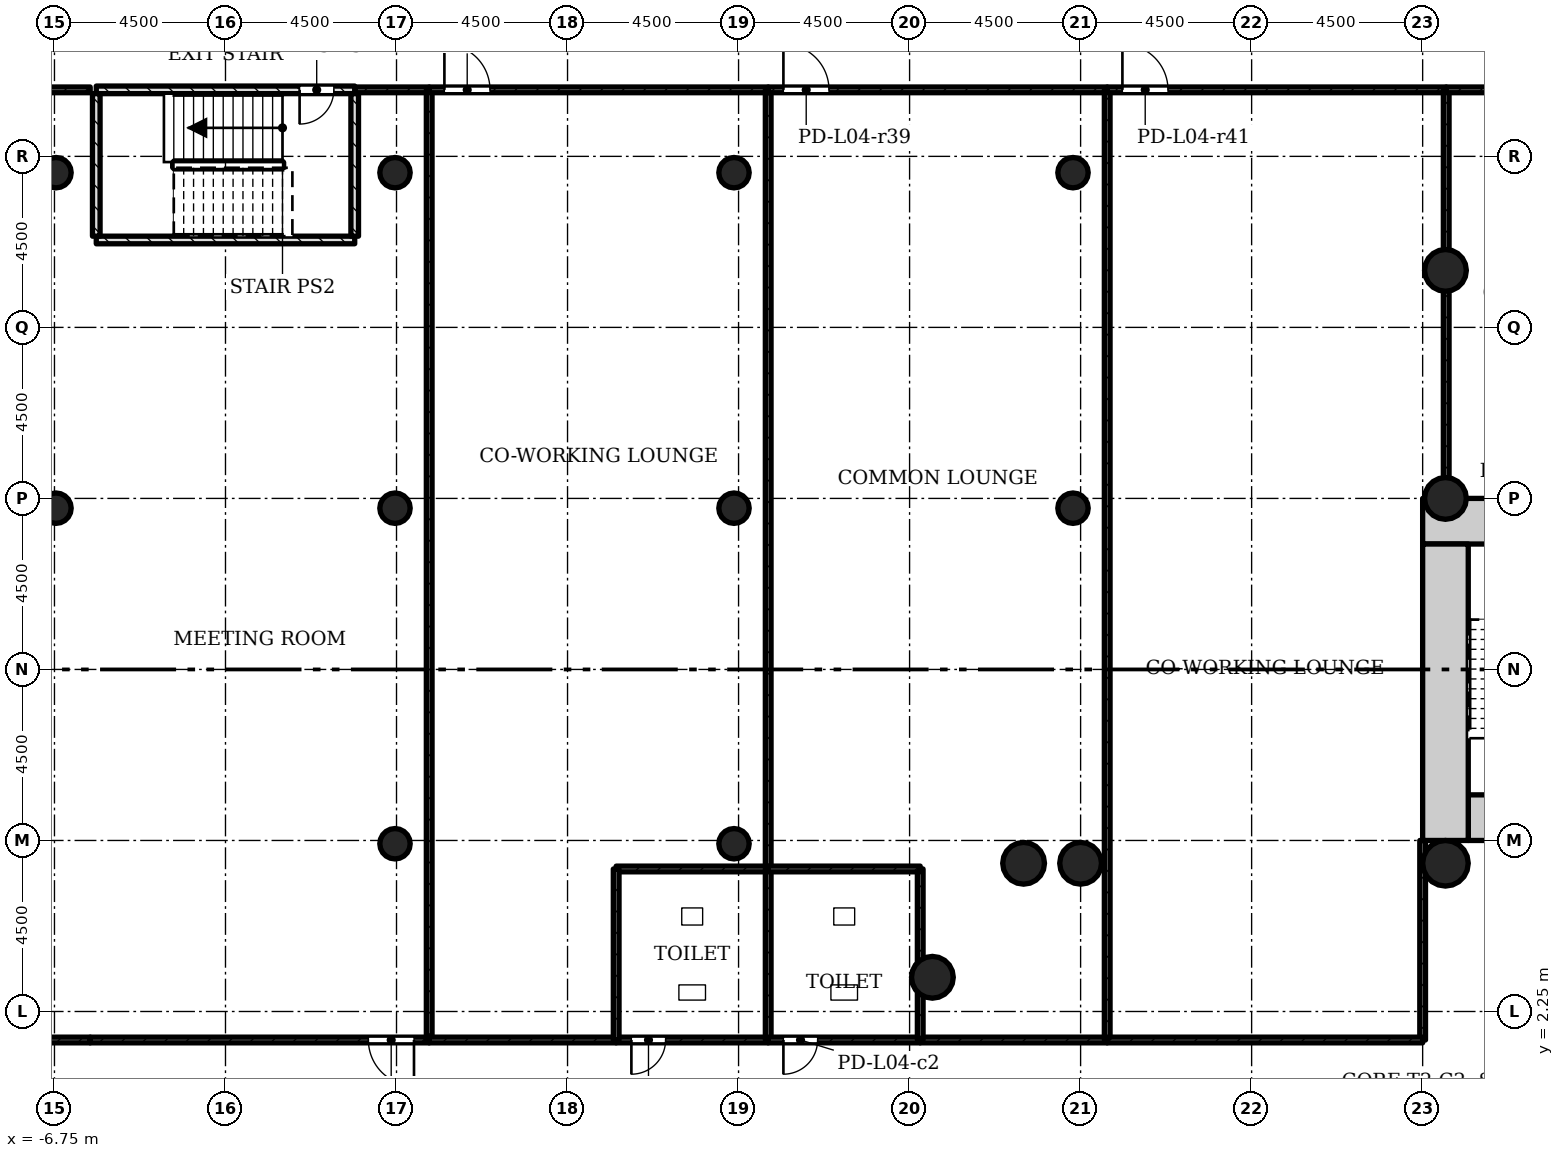
"""IFC4 building model, lengths in metres.
Left out: names, types, materials, properties, quantities, classifications, styles, units other than length and angle.
Written with IfcOpenShell. Run it as: python <this file> out.ifc"""

import sys

from ifc_helpers import new_model, si_unit, direction, frame, frame_2d, origin, origin_2d, place, context, subcontext, project, spatial, rectangle, hollow_circle, extrude, element, fill, save


model = new_model("IFC4")
c1 = context("Model", 3, precision=1e-05, world=origin(), true_north=direction((0.0, 1.0)))
c2 = subcontext(c1, "Body", "Model", "MODEL_VIEW")
j1 = project(units=[si_unit("LENGTHUNIT", "METRE"), si_unit("PLANEANGLEUNIT", "RADIAN")], contexts=[c1])
p1 = place(None, origin())
s1 = spatial("IfcSite", under=j1, at=p1, CompositionType="ELEMENT")
p2 = place(p1, origin())
s2 = spatial("IfcBuilding", under=s1, at=p2, CompositionType="ELEMENT")
p3 = place(p2, frame((0.0, 0.0, 20.0)))
s3 = spatial("IfcBuildingStorey", under=s2, at=p3, CompositionType="ELEMENT", Elevation=20.0)
p4 = place(p3, frame((30.45, 7.35, 0.0), z_axis=(0.0, 0.0, 1.0), x_axis=(1.0, 0.0, 0.0)))
e1 = element("IfcWall", 1, at=p4, inside=s3, PredefinedType="SHEAR", context=c2, shape_type="SweptSolid", body=[
    extrude(rectangle(XDim=12.3, YDim=1.2, at=frame_2d((6.15, 0.0))), origin(), (0.0, 0.0, 1.0), 4.5),
])
p5 = place(p4, frame((4.65, 0.0, 0.0)))
e2 = element("IfcOpeningElement", 2, at=p5, cuts=e1, PredefinedType="OPENING", context=c2, shape_type="SweptSolid", body=[
    extrude(rectangle(XDim=1.8, YDim=2.1, at=frame_2d((0.9, 1.05))), frame((0.0, 0.61, 0.0), z_axis=(0.0, -1.0, 0.0), x_axis=(1.0, 0.0, 0.0)), (0.0, 0.0, 1.0), 1.22),
])
p6 = place(p3, frame((41.55, 15.15, 0.0), z_axis=(0.0, 0.0, 1.0), x_axis=(-1.0, 0.0, 0.0)))
e3 = element("IfcWall", 3, at=p6, inside=s3, PredefinedType="SHEAR", context=c2, shape_type="SweptSolid", body=[
    extrude(rectangle(XDim=12.3, YDim=1.2, at=frame_2d((6.15, 0.0))), origin(), (0.0, 0.0, 1.0), 4.5),
])
p7 = place(p6, frame((4.65, 0.0, 0.0)))
e4 = element("IfcOpeningElement", 4, at=p7, cuts=e3, PredefinedType="OPENING", context=c2, shape_type="SweptSolid", body=[
    extrude(rectangle(XDim=1.8, YDim=2.1, at=frame_2d((0.9, 1.05))), frame((0.0, 0.61, 0.0), z_axis=(0.0, -1.0, 0.0), x_axis=(1.0, 0.0, 0.0)), (0.0, 0.0, 1.0), 1.22),
])
p8 = place(p3, frame((29.85, 14.55, 0.0), z_axis=(0.0, 0.0, 1.0), x_axis=(0.0, -1.0, 0.0)))
e5 = element("IfcWall", 5, at=p8, inside=s3, PredefinedType="SHEAR", context=c2, shape_type="SweptSolid", body=[
    extrude(rectangle(XDim=7.8, YDim=1.2, at=frame_2d((3.9, 0.0))), origin(), (0.0, 0.0, 1.0), 4.5),
])
for number, where, z_axis, x_axis in (
    (6, (29.85, 15.75, 0.0), (0.0, 0.0, 1.0), (1.0, 0.0, 0.0)),
    (7, (29.85, 21.75, 0.0), (0.0, 0.0, 1.0), (1.0, 0.0, 0.0)),
    (8, (20.25, 6.15, 0.0), (0.0, 0.0, 1.0), (1.0, 0.0, 0.0)),
    (9, (18.75, 6.15, 0.0), (0.0, 0.0, 1.0), (1.0, 0.0, 0.0)),
    (10, (16.35, 3.15, 0.0), (0.0, 0.0, 1.0), (1.0, 0.0, 0.0)),
):
    element("IfcColumn", number, at=place(p3, frame(where, z_axis=z_axis, x_axis=x_axis)), inside=s3, PredefinedType="COLUMN", context=c2, shape_type="SweptSolid", body=[
        extrude(hollow_circle(Radius=0.55, WallThickness=0.04, at=origin_2d()), origin(), (0.0, 0.0, 1.0), 4.5),
    ])
p9 = place(p3, frame((29.85, 6.15, 0.0), z_axis=(0.0, 0.0, 1.0), x_axis=(1.0, 0.0, 0.0)))
e11 = element("IfcColumn", 11, at=p9, inside=s3, PredefinedType="COLUMN", context=c2, shape_type="SweptSolid", body=[
    extrude(hollow_circle(Radius=0.6, WallThickness=0.045, at=origin_2d()), origin(), (0.0, 0.0, 1.0), 4.5),
])
for number, where, z_axis, x_axis in (
    (12, (2.21, 6.664, 0.0), (0.0, 0.0, 1.0), (1.0, 0.0, 0.0)),
    (13, (11.13, 6.664, 0.0), (0.0, 0.0, 1.0), (1.0, 0.0, 0.0)),
    (14, (-6.71, 15.493, 0.0), (0.0, 0.0, 1.0), (1.0, 0.0, 0.0)),
    (15, (2.21, 15.493, 0.0), (0.0, 0.0, 1.0), (1.0, 0.0, 0.0)),
    (16, (11.13, 15.493, 0.0), (0.0, 0.0, 1.0), (1.0, 0.0, 0.0)),
    (17, (20.05, 15.493, 0.0), (0.0, 0.0, 1.0), (1.0, 0.0, 0.0)),
    (18, (-6.71, 24.321, 0.0), (0.0, 0.0, 1.0), (1.0, 0.0, 0.0)),
    (19, (2.21, 24.321, 0.0), (0.0, 0.0, 1.0), (1.0, 0.0, 0.0)),
    (20, (11.13, 24.321, 0.0), (0.0, 0.0, 1.0), (1.0, 0.0, 0.0)),
    (21, (20.05, 24.321, 0.0), (0.0, 0.0, 1.0), (1.0, 0.0, 0.0)),
):
    element("IfcColumn", number, at=place(p3, frame(where, z_axis=z_axis, x_axis=x_axis)), inside=s3, PredefinedType="COLUMN", context=c2, shape_type="SweptSolid", body=[
        extrude(hollow_circle(Radius=0.4, WallThickness=0.028, at=origin_2d()), origin(), (0.0, 0.0, 1.0), 4.08),
    ])
p10 = place(p3, frame((-14.73, 26.5, 0.0), z_axis=(0.0, 0.0, 1.0), x_axis=(1.0, 0.0, 0.0)))
e22 = element("IfcWall", 22, at=p10, inside=s3, PredefinedType="PARTITIONING", context=c2, shape_type="SweptSolid", body=[
    extrude(rectangle(XDim=8.92, YDim=0.15, at=frame_2d((4.46, 0.0))), origin(), (0.0, 0.0, 1.0), 4.075),
])
p11 = place(p10, frame((0.4, 0.0, 0.0)))
e23 = element("IfcOpeningElement", 23, at=p11, cuts=e22, PredefinedType="OPENING", context=c2, shape_type="SweptSolid", body=[
    extrude(rectangle(XDim=1.2, YDim=2.1, at=frame_2d((0.6, 1.05))), frame((0.0, 0.085, 0.0), z_axis=(0.0, -1.0, 0.0), x_axis=(1.0, 0.0, 0.0)), (0.0, 0.0, 1.0), 0.17),
])
p12 = place(p3, frame((-5.81, 1.5, 0.0), z_axis=(0.0, 0.0, 1.0), x_axis=(-1.0, 0.0, 0.0)))
e24 = element("IfcWall", 24, at=p12, inside=s3, PredefinedType="PARTITIONING", context=c2, shape_type="SweptSolid", body=[
    extrude(rectangle(XDim=8.92, YDim=0.15, at=frame_2d((4.46, 0.0))), origin(), (0.0, 0.0, 1.0), 4.075),
])
p13 = place(p3, frame((-5.65, 26.5, 0.0), z_axis=(0.0, 0.0, 1.0), x_axis=(1.0, 0.0, 0.0)))
e25 = element("IfcWall", 25, at=p13, inside=s3, PredefinedType="SHEAR", context=c2, shape_type="SweptSolid", body=[
    extrude(rectangle(XDim=6.8, YDim=0.2, at=frame_2d((3.4, 0.0))), origin(), (0.0, 0.0, 1.0), 4.075),
])
p14 = place(p13, frame((5.35, 0.0, 0.0)))
e26 = element("IfcOpeningElement", 26, at=p14, cuts=e25, PredefinedType="OPENING", context=c2, shape_type="SweptSolid", body=[
    extrude(rectangle(XDim=0.9, YDim=2.1, at=frame_2d((0.45, 1.05))), frame((0.0, 0.11, 0.0), z_axis=(0.0, -1.0, 0.0), x_axis=(1.0, 0.0, 0.0)), (0.0, 0.0, 1.0), 0.22),
])
p15 = place(p3, frame((-5.65, 22.55, 0.0), z_axis=(0.0, 0.0, 1.0), x_axis=(1.0, 0.0, 0.0)))
e27 = element("IfcWall", 27, at=p15, inside=s3, PredefinedType="SHEAR", context=c2, shape_type="SweptSolid", body=[
    extrude(rectangle(XDim=6.8, YDim=0.2, at=frame_2d((3.4, 0.0))), origin(), (0.0, 0.0, 1.0), 4.075),
])
for number, where, z_axis, x_axis in (
    (28, (-5.65, 22.65, 0.0), (0.0, 0.0, 1.0), (0.0, 1.0, 0.0)),
    (29, (1.15, 22.65, 0.0), (0.0, 0.0, 1.0), (0.0, 1.0, 0.0)),
):
    element("IfcWall", number, at=place(p3, frame(where, z_axis=z_axis, x_axis=x_axis)), inside=s3, PredefinedType="SHEAR", context=c2, shape_type="SweptSolid", body=[
        extrude(rectangle(XDim=3.75, YDim=0.2, at=frame_2d((1.875, 0.0))), origin(), (0.0, 0.0, 1.0), 4.075),
    ])
p16 = place(p3, frame((1.15, 26.5, 0.0), z_axis=(0.0, 0.0, 1.0), x_axis=(1.0, 0.0, 0.0)))
e30 = element("IfcWall", 30, at=p16, inside=s3, PredefinedType="PARTITIONING", context=c2, shape_type="SweptSolid", body=[
    extrude(rectangle(XDim=1.96, YDim=0.15, at=frame_2d((0.98, 0.0))), origin(), (0.0, 0.0, 1.0), 4.075),
])
p17 = place(p3, frame((3.11, 1.5, 0.0), z_axis=(0.0, 0.0, 1.0), x_axis=(-1.0, 0.0, 0.0)))
e31 = element("IfcWall", 31, at=p17, inside=s3, PredefinedType="PARTITIONING", context=c2, shape_type="SweptSolid", body=[
    extrude(rectangle(XDim=8.92, YDim=0.15, at=frame_2d((4.46, 0.0))), origin(), (0.0, 0.0, 1.0), 4.075),
])
p18 = place(p17, frame((0.4, 0.0, 0.0)))
e32 = element("IfcOpeningElement", 32, at=p18, cuts=e31, PredefinedType="OPENING", context=c2, shape_type="SweptSolid", body=[
    extrude(rectangle(XDim=1.2, YDim=2.1, at=frame_2d((0.6, 1.05))), frame((0.0, 0.085, 0.0), z_axis=(0.0, -1.0, 0.0), x_axis=(1.0, 0.0, 0.0)), (0.0, 0.0, 1.0), 0.17),
])
p19 = place(p3, frame((3.11, 26.5, 0.0), z_axis=(0.0, 0.0, 1.0), x_axis=(0.0, -1.0, 0.0)))
e33 = element("IfcWall", 33, at=p19, inside=s3, PredefinedType="PARTITIONING", context=c2, shape_type="SweptSolid", body=[
    extrude(rectangle(XDim=25.0, YDim=0.15, at=frame_2d((12.5, 0.0))), origin(), (0.0, 0.0, 1.0), 4.075),
])
p20 = place(p3, frame((8.03, 1.5, 0.0), z_axis=(0.0, 0.0, 1.0), x_axis=(-1.0, 0.0, 0.0)))
e34 = element("IfcWall", 34, at=p20, inside=s3, PredefinedType="PARTITIONING", context=c2, shape_type="SweptSolid", body=[
    extrude(rectangle(XDim=4.92, YDim=0.15, at=frame_2d((2.46, 0.0))), origin(), (0.0, 0.0, 1.0), 4.075),
])
p21 = place(p3, frame((3.11, 26.5, 0.0), z_axis=(0.0, 0.0, 1.0), x_axis=(1.0, 0.0, 0.0)))
e35 = element("IfcWall", 35, at=p21, inside=s3, PredefinedType="PARTITIONING", context=c2, shape_type="SweptSolid", body=[
    extrude(rectangle(XDim=8.92, YDim=0.15, at=frame_2d((4.46, 0.0))), origin(), (0.0, 0.0, 1.0), 4.075),
])
p22 = place(p21, frame((0.4, 0.0, 0.0)))
e36 = element("IfcOpeningElement", 36, at=p22, cuts=e35, PredefinedType="OPENING", context=c2, shape_type="SweptSolid", body=[
    extrude(rectangle(XDim=1.2, YDim=2.1, at=frame_2d((0.6, 1.05))), frame((0.0, 0.085, 0.0), z_axis=(0.0, -1.0, 0.0), x_axis=(1.0, 0.0, 0.0)), (0.0, 0.0, 1.0), 0.17),
])
p23 = place(p3, frame((12.03, 26.5, 0.0), z_axis=(0.0, 0.0, 1.0), x_axis=(0.0, -1.0, 0.0)))
e37 = element("IfcWall", 37, at=p23, inside=s3, PredefinedType="PARTITIONING", context=c2, shape_type="SweptSolid", body=[
    extrude(rectangle(XDim=20.5, YDim=0.15, at=frame_2d((10.25, 0.0))), origin(), (0.0, 0.0, 1.0), 4.075),
])
p24 = place(p3, frame((12.03, 26.5, 0.0), z_axis=(0.0, 0.0, 1.0), x_axis=(1.0, 0.0, 0.0)))
e38 = element("IfcWall", 38, at=p24, inside=s3, PredefinedType="PARTITIONING", context=c2, shape_type="SweptSolid", body=[
    extrude(rectangle(XDim=8.92, YDim=0.15, at=frame_2d((4.46, 0.0))), origin(), (0.0, 0.0, 1.0), 4.075),
])
p25 = place(p24, frame((0.4, 0.0, 0.0)))
e39 = element("IfcOpeningElement", 39, at=p25, cuts=e38, PredefinedType="OPENING", context=c2, shape_type="SweptSolid", body=[
    extrude(rectangle(XDim=1.2, YDim=2.1, at=frame_2d((0.6, 1.05))), frame((0.0, 0.085, 0.0), z_axis=(0.0, -1.0, 0.0), x_axis=(1.0, 0.0, 0.0)), (0.0, 0.0, 1.0), 0.17),
])
p26 = place(p3, frame((20.95, 1.5, 0.0), z_axis=(0.0, 0.0, 1.0), x_axis=(-1.0, 0.0, 0.0)))
e40 = element("IfcWall", 40, at=p26, inside=s3, PredefinedType="PARTITIONING", context=c2, shape_type="SweptSolid", body=[
    extrude(rectangle(XDim=4.92, YDim=0.15, at=frame_2d((2.46, 0.0))), origin(), (0.0, 0.0, 1.0), 4.075),
])
p27 = place(p3, frame((20.95, 26.5, 0.0), z_axis=(0.0, 0.0, 1.0), x_axis=(0.0, -1.0, 0.0)))
e41 = element("IfcWall", 41, at=p27, inside=s3, PredefinedType="PARTITIONING", context=c2, shape_type="SweptSolid", body=[
    extrude(rectangle(XDim=25.0, YDim=0.15, at=frame_2d((12.5, 0.0))), origin(), (0.0, 0.0, 1.0), 4.075),
])
p28 = place(p3, frame((20.95, 26.5, 0.0), z_axis=(0.0, 0.0, 1.0), x_axis=(1.0, 0.0, 0.0)))
e42 = element("IfcWall", 42, at=p28, inside=s3, PredefinedType="PARTITIONING", context=c2, shape_type="SweptSolid", body=[
    extrude(rectangle(XDim=8.92, YDim=0.15, at=frame_2d((4.46, 0.0))), origin(), (0.0, 0.0, 1.0), 4.075),
])
p29 = place(p28, frame((0.4, 0.0, 0.0)))
e43 = element("IfcOpeningElement", 43, at=p29, cuts=e42, PredefinedType="OPENING", context=c2, shape_type="SweptSolid", body=[
    extrude(rectangle(XDim=1.2, YDim=2.1, at=frame_2d((0.6, 1.05))), frame((0.0, 0.085, 0.0), z_axis=(0.0, -1.0, 0.0), x_axis=(1.0, 0.0, 0.0)), (0.0, 0.0, 1.0), 0.17),
])
p30 = place(p3, frame((29.25, 6.75, 0.0), z_axis=(0.0, 0.0, 1.0), x_axis=(0.0, -1.0, 0.0)))
e44 = element("IfcWall", 44, at=p30, inside=s3, PredefinedType="PARTITIONING", context=c2, shape_type="SweptSolid", body=[
    extrude(rectangle(XDim=5.25, YDim=0.15, at=frame_2d((2.625, 0.0))), origin(), (0.0, 0.0, 1.0), 4.075),
])
p31 = place(p3, frame((29.25, 1.5, 0.0), z_axis=(0.0, 0.0, 1.0), x_axis=(-1.0, 0.0, 0.0)))
e45 = element("IfcWall", 45, at=p31, inside=s3, PredefinedType="PARTITIONING", context=c2, shape_type="SweptSolid", body=[
    extrude(rectangle(XDim=8.3, YDim=0.15, at=frame_2d((4.15, 0.0))), origin(), (0.0, 0.0, 1.0), 4.075),
])
p32 = place(p3, frame((29.87, 26.5, 0.0), z_axis=(0.0, 0.0, 1.0), x_axis=(0.0, -1.0, 0.0)))
e46 = element("IfcWall", 46, at=p32, inside=s3, PredefinedType="PARTITIONING", context=c2, shape_type="SweptSolid", body=[
    extrude(rectangle(XDim=4.75, YDim=0.15, at=frame_2d((2.375, 0.0))), origin(), (0.0, 0.0, 1.0), 4.075),
])
p33 = place(p3, frame((29.87, 21.75, 0.0), z_axis=(0.0, 0.0, 1.0), x_axis=(0.0, -1.0, 0.0)))
e47 = element("IfcWall", 47, at=p33, inside=s3, PredefinedType="PARTITIONING", context=c2, shape_type="SweptSolid", body=[
    extrude(rectangle(XDim=6.0, YDim=0.15, at=frame_2d((3.0, 0.0))), origin(), (0.0, 0.0, 1.0), 3.65),
])
p34 = place(p3, frame((29.87, 26.5, 0.0), z_axis=(0.0, 0.0, 1.0), x_axis=(1.0, 0.0, 0.0)))
e48 = element("IfcWall", 48, at=p34, inside=s3, PredefinedType="PARTITIONING", context=c2, shape_type="SweptSolid", body=[
    extrude(rectangle(XDim=4.63, YDim=0.15, at=frame_2d((2.315, 0.0))), origin(), (0.0, 0.0, 1.0), 4.075),
])
p35 = place(p3, frame((8.03, 1.5, 0.0), z_axis=(0.0, 0.0, 1.0), x_axis=(1.0, 0.0, 0.0)))
e49 = element("IfcWall", 49, at=p35, inside=s3, PredefinedType="PARTITIONING", context=c2, shape_type="SweptSolid", body=[
    extrude(rectangle(XDim=4.0, YDim=0.15, at=frame_2d((2.0, 0.0))), origin(), (0.0, 0.0, 1.0), 4.075),
])
p36 = place(p35, frame((0.4, 0.0, 0.0)))
e50 = element("IfcOpeningElement", 50, at=p36, cuts=e49, PredefinedType="OPENING", context=c2, shape_type="SweptSolid", body=[
    extrude(rectangle(XDim=0.9, YDim=2.1, at=frame_2d((0.45, 1.05))), frame((0.0, 0.085, 0.0), z_axis=(0.0, -1.0, 0.0), x_axis=(1.0, 0.0, 0.0)), (0.0, 0.0, 1.0), 0.17),
])
p37 = place(p3, frame((12.03, 6.0, 0.0), z_axis=(0.0, 0.0, 1.0), x_axis=(-1.0, 0.0, 0.0)))
e51 = element("IfcWall", 51, at=p37, inside=s3, PredefinedType="PARTITIONING", context=c2, shape_type="SweptSolid", body=[
    extrude(rectangle(XDim=4.0, YDim=0.15, at=frame_2d((2.0, 0.0))), origin(), (0.0, 0.0, 1.0), 4.075),
])
for number, where, z_axis, x_axis in (
    (52, (8.03, 6.0, 0.0), (0.0, 0.0, 1.0), (0.0, -1.0, 0.0)),
    (53, (12.03, 1.5, 0.0), (0.0, 0.0, 1.0), (0.0, 1.0, 0.0)),
):
    element("IfcWall", number, at=place(p3, frame(where, z_axis=z_axis, x_axis=x_axis)), inside=s3, PredefinedType="PARTITIONING", context=c2, shape_type="SweptSolid", body=[
        extrude(rectangle(XDim=4.5, YDim=0.15, at=frame_2d((2.25, 0.0))), origin(), (0.0, 0.0, 1.0), 4.075),
    ])
p38 = place(p3, frame((12.03, 1.5, 0.0), z_axis=(0.0, 0.0, 1.0), x_axis=(1.0, 0.0, 0.0)))
e54 = element("IfcWall", 54, at=p38, inside=s3, PredefinedType="PARTITIONING", context=c2, shape_type="SweptSolid", body=[
    extrude(rectangle(XDim=4.0, YDim=0.15, at=frame_2d((2.0, 0.0))), origin(), (0.0, 0.0, 1.0), 4.075),
])
p39 = place(p38, frame((0.4, 0.0, 0.0)))
e55 = element("IfcOpeningElement", 55, at=p39, cuts=e54, PredefinedType="OPENING", context=c2, shape_type="SweptSolid", body=[
    extrude(rectangle(XDim=0.9, YDim=2.1, at=frame_2d((0.45, 1.05))), frame((0.0, 0.085, 0.0), z_axis=(0.0, -1.0, 0.0), x_axis=(1.0, 0.0, 0.0)), (0.0, 0.0, 1.0), 0.17),
])
p40 = place(p3, frame((16.03, 1.5, 0.0), z_axis=(0.0, 0.0, 1.0), x_axis=(0.0, 1.0, 0.0)))
e56 = element("IfcWall", 56, at=p40, inside=s3, PredefinedType="PARTITIONING", context=c2, shape_type="SweptSolid", body=[
    extrude(rectangle(XDim=4.5, YDim=0.15, at=frame_2d((2.25, 0.0))), origin(), (0.0, 0.0, 1.0), 4.075),
])
p41 = place(p3, frame((16.03, 6.0, 0.0), z_axis=(0.0, 0.0, 1.0), x_axis=(-1.0, 0.0, 0.0)))
e57 = element("IfcWall", 57, at=p41, inside=s3, PredefinedType="PARTITIONING", context=c2, shape_type="SweptSolid", body=[
    extrude(rectangle(XDim=4.0, YDim=0.15, at=frame_2d((2.0, 0.0))), origin(), (0.0, 0.0, 1.0), 4.075),
])
p42 = place(p14, origin())
e58 = element("IfcDoor", 58, at=p42, inside=s3, OperationType="SINGLE_SWING_LEFT", PredefinedType="DOOR", context=c2, shape_type="SweptSolid", body=[
    extrude(rectangle(XDim=0.9, YDim=2.1, at=frame_2d((0.45, 1.05))), frame((0.0, 0.025, 0.0), z_axis=(0.0, -1.0, 0.0), x_axis=(1.0, 0.0, 0.0)), (0.0, 0.0, 1.0), 0.05),
])
fill(e26, e58)
p43 = place(p18, origin())
e59 = element("IfcDoor", 59, at=p43, inside=s3, OperationType="SINGLE_SWING_RIGHT", PredefinedType="DOOR", context=c2, shape_type="SweptSolid", body=[
    extrude(rectangle(XDim=1.2, YDim=2.1, at=frame_2d((0.6, 1.05))), frame((0.0, 0.025, 0.0), z_axis=(0.0, -1.0, 0.0), x_axis=(1.0, 0.0, 0.0)), (0.0, 0.0, 1.0), 0.05),
])
fill(e32, e59)
p44 = place(p22, origin())
e60 = element("IfcDoor", 60, at=p44, inside=s3, OperationType="SINGLE_SWING_RIGHT", PredefinedType="DOOR", context=c2, shape_type="SweptSolid", body=[
    extrude(rectangle(XDim=1.2, YDim=2.1, at=frame_2d((0.6, 1.05))), frame((0.0, 0.025, 0.0), z_axis=(0.0, -1.0, 0.0), x_axis=(1.0, 0.0, 0.0)), (0.0, 0.0, 1.0), 0.05),
])
fill(e36, e60)
p45 = place(p25, origin())
e61 = element("IfcDoor", 61, at=p45, inside=s3, OperationType="SINGLE_SWING_RIGHT", PredefinedType="DOOR", context=c2, shape_type="SweptSolid", body=[
    extrude(rectangle(XDim=1.2, YDim=2.1, at=frame_2d((0.6, 1.05))), frame((0.0, 0.025, 0.0), z_axis=(0.0, -1.0, 0.0), x_axis=(1.0, 0.0, 0.0)), (0.0, 0.0, 1.0), 0.05),
])
fill(e39, e61)
p46 = place(p29, origin())
e62 = element("IfcDoor", 62, at=p46, inside=s3, OperationType="SINGLE_SWING_RIGHT", PredefinedType="DOOR", context=c2, shape_type="SweptSolid", body=[
    extrude(rectangle(XDim=1.2, YDim=2.1, at=frame_2d((0.6, 1.05))), frame((0.0, 0.025, 0.0), z_axis=(0.0, -1.0, 0.0), x_axis=(1.0, 0.0, 0.0)), (0.0, 0.0, 1.0), 0.05),
])
fill(e43, e62)
p47 = place(p36, origin())
e63 = element("IfcDoor", 63, at=p47, inside=s3, OperationType="SINGLE_SWING_LEFT", PredefinedType="DOOR", context=c2, shape_type="SweptSolid", body=[
    extrude(rectangle(XDim=0.9, YDim=2.1, at=frame_2d((0.45, 1.05))), frame((0.0, 0.025, 0.0), z_axis=(0.0, -1.0, 0.0), x_axis=(1.0, 0.0, 0.0)), (0.0, 0.0, 1.0), 0.05),
])
fill(e50, e63)
p48 = place(p39, origin())
e64 = element("IfcDoor", 64, at=p48, inside=s3, OperationType="SINGLE_SWING_LEFT", PredefinedType="DOOR", context=c2, shape_type="SweptSolid", body=[
    extrude(rectangle(XDim=0.9, YDim=2.1, at=frame_2d((0.45, 1.05))), frame((0.0, 0.025, 0.0), z_axis=(0.0, -1.0, 0.0), x_axis=(1.0, 0.0, 0.0)), (0.0, 0.0, 1.0), 0.05),
])
fill(e55, e64)
save(model, sys.argv[1])
